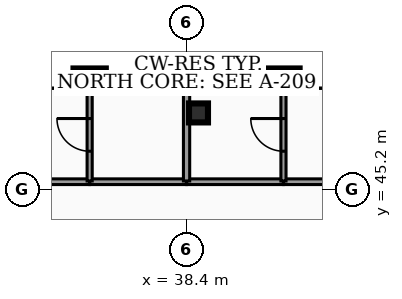
"""IFC4 building model, lengths in metres.
Left out: names, types, materials, properties, quantities, classifications, styles, units other than length and angle.
Written with IfcOpenShell. Run it as: python <this file> out.ifc"""

import sys

from ifc_helpers import new_model, si_unit, direction, frame, frame_2d, origin, origin_2d, place, context, subcontext, project, spatial, rectangle, hollow_rectangle, extrude, element, fill, save


model = new_model("IFC4")
c1 = context("Model", 3, precision=1e-05, world=origin(), true_north=direction((0.0, 1.0)))
c2 = subcontext(c1, "Body", "Model", "MODEL_VIEW")
j1 = project(units=[si_unit("LENGTHUNIT", "METRE"), si_unit("PLANEANGLEUNIT", "RADIAN")], contexts=[c1])
p1 = place(None, origin())
s1 = spatial("IfcSite", under=j1, at=p1, CompositionType="ELEMENT")
p2 = place(p1, origin())
s2 = spatial("IfcBuilding", under=s1, at=p2, CompositionType="ELEMENT")
p3 = place(p2, frame((0.0, 0.0, 265.2)))
s3 = spatial("IfcBuildingStorey", under=s2, at=p3, CompositionType="ELEMENT", Elevation=265.2)
p4 = place(p3, frame((38.714, 47.217, 0.0), z_axis=(-0.049732120532, -0.036628588003, 0.998090708667), x_axis=(0.593029744419, -0.805180552569, 0.0)))
e1 = element("IfcColumn", 1, at=p4, inside=s3, PredefinedType="COLUMN", context=c2, shape_type="SweptSolid", body=[
    extrude(hollow_rectangle(XDim=0.5, YDim=0.5, WallThickness=0.025, at=origin_2d()), origin(), (0.0, 0.0, 1.0), 3.186),
])
p5 = place(p3, frame((26.57, 45.407, 0.0), z_axis=(0.0, 0.0, 1.0), x_axis=(1.0, 0.0, 0.0)))
e2 = element("IfcWall", 2, at=p5, inside=s3, PredefinedType="PARTITIONING", context=c2, shape_type="SweptSolid", body=[
    extrude(rectangle(XDim=9.275, YDim=0.15, at=frame_2d((4.637, 0.0))), origin(), (0.0, 0.0, 1.0), 2.235),
])
p6 = place(p3, frame((35.855, 45.407, 0.0), z_axis=(0.0, 0.0, 1.0), x_axis=(1.0, 0.0, 0.0)))
e3 = element("IfcWall", 3, at=p6, inside=s3, PredefinedType="PARTITIONING", context=c2, shape_type="SweptSolid", body=[
    extrude(rectangle(XDim=2.54, YDim=0.15, at=frame_2d((1.27, 0.0))), origin(), (0.0, 0.0, 1.0), 2.235),
])
p7 = place(p3, frame((40.955, 45.407, 0.0), z_axis=(0.0, 0.0, 1.0), x_axis=(1.0, 0.0, 0.0)))
e4 = element("IfcWall", 4, at=p7, inside=s3, PredefinedType="PARTITIONING", context=c2, shape_type="SweptSolid", body=[
    extrude(rectangle(XDim=9.375, YDim=0.15, at=frame_2d((4.688, 0.0))), origin(), (0.0, 0.0, 1.0), 2.235),
])
p8 = place(p3, frame((38.405, 45.407, 0.0), z_axis=(0.0, 0.0, 1.0), x_axis=(1.0, 0.0, 0.0)))
e5 = element("IfcWall", 5, at=p8, inside=s3, PredefinedType="PARTITIONING", context=c2, shape_type="SweptSolid", body=[
    extrude(rectangle(XDim=2.54, YDim=0.15, at=frame_2d((1.27, 0.0))), origin(), (0.0, 0.0, 1.0), 2.235),
])
p9 = place(p3, frame((35.85, 45.427, 0.0), z_axis=(0.0, 0.0, 1.0), x_axis=(0.0, 1.0, 0.0)))
e6 = element("IfcWall", 6, at=p9, inside=s3, PredefinedType="PARTITIONING", context=c2, shape_type="SweptSolid", body=[
    extrude(rectangle(XDim=2.425, YDim=0.135, at=frame_2d((1.212, 0.0))), origin(), (0.0, 0.0, 1.0), 2.235),
])
p10 = place(p9, frame((0.782, 0.0, 0.0)))
e7 = element("IfcOpeningElement", 7, at=p10, cuts=e6, PredefinedType="OPENING", context=c2, shape_type="SweptSolid", body=[
    extrude(rectangle(XDim=0.86, YDim=2.05, at=frame_2d((0.43, 1.025))), frame((0.0, 0.077, 0.0), z_axis=(0.0, -1.0, 0.0), x_axis=(1.0, 0.0, 0.0)), (0.0, 0.0, 1.0), 0.155),
])
p11 = place(p3, frame((38.4, 45.427, 0.0), z_axis=(0.0, 0.0, 1.0), x_axis=(0.0, 1.0, 0.0)))
e8 = element("IfcWall", 8, at=p11, inside=s3, PredefinedType="PARTITIONING", context=c2, shape_type="SweptSolid", body=[
    extrude(rectangle(XDim=2.425, YDim=0.165, at=frame_2d((1.212, 0.0))), origin(), (0.0, 0.0, 1.0), 2.235),
])
p12 = place(p3, frame((40.95, 45.427, 0.0), z_axis=(0.0, 0.0, 1.0), x_axis=(0.0, 1.0, 0.0)))
e9 = element("IfcWall", 9, at=p12, inside=s3, PredefinedType="PARTITIONING", context=c2, shape_type="SweptSolid", body=[
    extrude(rectangle(XDim=2.425, YDim=0.135, at=frame_2d((1.212, 0.0))), origin(), (0.0, 0.0, 1.0), 2.235),
])
p13 = place(p12, frame((0.782, 0.0, 0.0)))
e10 = element("IfcOpeningElement", 10, at=p13, cuts=e9, PredefinedType="OPENING", context=c2, shape_type="SweptSolid", body=[
    extrude(rectangle(XDim=0.86, YDim=2.05, at=frame_2d((0.43, 1.025))), frame((0.0, 0.077, 0.0), z_axis=(0.0, -1.0, 0.0), x_axis=(1.0, 0.0, 0.0)), (0.0, 0.0, 1.0), 0.155),
])
p14 = place(p10, origin())
e11 = element("IfcDoor", 11, at=p14, inside=s3, OperationType="SINGLE_SWING_RIGHT", PredefinedType="DOOR", context=c2, shape_type="SweptSolid", body=[
    extrude(rectangle(XDim=0.86, YDim=2.05, at=frame_2d((0.43, 1.025))), frame((0.0, 0.025, 0.0), z_axis=(0.0, -1.0, 0.0), x_axis=(1.0, 0.0, 0.0)), (0.0, 0.0, 1.0), 0.05),
])
fill(e7, e11)
p15 = place(p13, origin())
e12 = element("IfcDoor", 12, at=p15, inside=s3, OperationType="SINGLE_SWING_RIGHT", PredefinedType="DOOR", context=c2, shape_type="SweptSolid", body=[
    extrude(rectangle(XDim=0.86, YDim=2.05, at=frame_2d((0.43, 1.025))), frame((0.0, 0.025, 0.0), z_axis=(0.0, -1.0, 0.0), x_axis=(1.0, 0.0, 0.0)), (0.0, 0.0, 1.0), 0.05),
])
fill(e10, e12)
save(model, sys.argv[1])
